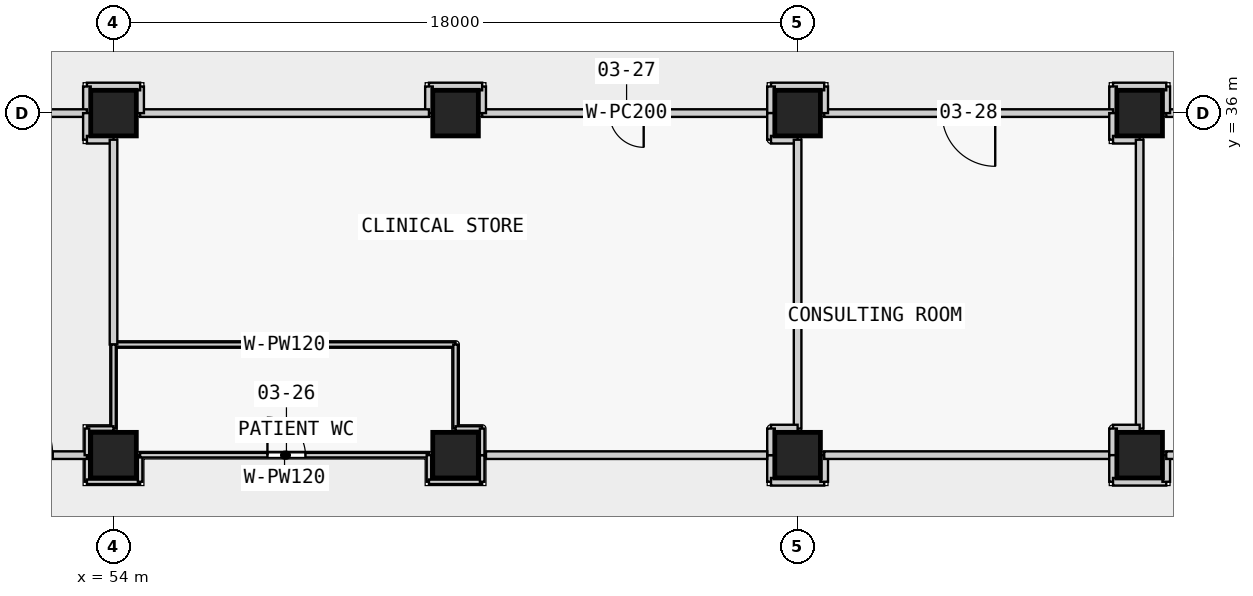
"""IFC4 building model, lengths in metres.
Left out: names, types, materials, properties, quantities, classifications, styles, units other than length and angle.
Written with IfcOpenShell. Run it as: python <this file> out.ifc"""

import sys

from ifc_helpers import new_model, si_unit, direction, frame, frame_2d, origin, origin_2d, place, context, subcontext, project, spatial, rectangle, extrude, element, fill, save


model = new_model("IFC4")
c1 = context("Model", 3, precision=1e-05, world=origin(), true_north=direction((0.0, 1.0)))
c2 = subcontext(c1, "Body", "Model", "MODEL_VIEW")
j1 = project(units=[si_unit("LENGTHUNIT", "METRE"), si_unit("PLANEANGLEUNIT", "RADIAN")], contexts=[c1])
p1 = place(None, origin())
s1 = spatial("IfcSite", under=j1, at=p1, CompositionType="ELEMENT")
p2 = place(p1, origin())
s2 = spatial("IfcBuilding", under=s1, at=p2, CompositionType="ELEMENT")
p3 = place(p2, frame((0.0, 0.0, 17.3)))
s3 = spatial("IfcBuildingStorey", under=s2, at=p3, CompositionType="ELEMENT", Elevation=17.3)
for number, where, z_axis, x_axis in (
    (1, (54.0, 27.0, 0.0), (0.0, 0.0, 1.0), (1.0, 0.0, 0.0)),
    (2, (54.0, 36.0, 0.0), (0.0, 0.0, 1.0), (1.0, 0.0, 0.0)),
    (3, (63.0, 27.0, 0.0), (0.0, 0.0, 1.0), (1.0, 0.0, 0.0)),
    (4, (63.0, 36.0, 0.0), (0.0, 0.0, 1.0), (1.0, 0.0, 0.0)),
    (5, (72.0, 27.0, 0.0), (0.0, 0.0, 1.0), (1.0, 0.0, 0.0)),
    (6, (72.0, 36.0, 0.0), (0.0, 0.0, 1.0), (1.0, 0.0, 0.0)),
    (7, (81.0, 27.0, 0.0), (0.0, 0.0, 1.0), (1.0, 0.0, 0.0)),
    (8, (81.0, 36.0, 0.0), (0.0, 0.0, 1.0), (1.0, 0.0, 0.0)),
):
    element("IfcColumn", number, at=place(p3, frame(where, z_axis=z_axis, x_axis=x_axis)), inside=s3, PredefinedType="COLUMN", context=c2, shape_type="SweptSolid", body=[
        extrude(rectangle(XDim=1.2, YDim=1.2, at=origin_2d()), origin(), (0.0, 0.0, 1.0), 4.5),
    ])
p4 = place(p3, frame((71.3, 36.0, 0.0), z_axis=(0.0, 0.0, 1.0), x_axis=(-1.0, 0.0, 0.0)))
e9 = element("IfcWall", 9, at=p4, inside=s3, PredefinedType="PARTITIONING", context=c2, shape_type="SweptSolid", body=[
    extrude(rectangle(XDim=7.6, YDim=0.2, at=frame_2d((3.8, 0.0))), origin(), (0.0, 0.0, 1.0), 4.15),
])
p5 = place(p4, frame((3.35, 0.0, 0.0)))
e10 = element("IfcOpeningElement", 10, at=p5, cuts=e9, PredefinedType="OPENING", context=c2, shape_type="SweptSolid", body=[
    extrude(rectangle(XDim=0.9, YDim=2.1, at=frame_2d((0.45, 1.05))), frame((0.0, 0.11, 0.0), z_axis=(0.0, -1.0, 0.0), x_axis=(1.0, 0.0, 0.0)), (0.0, 0.0, 1.0), 0.22),
])
p6 = place(p3, frame((63.7, 36.0, 0.0), z_axis=(0.0, 0.0, 1.0), x_axis=(0.0, 1.0, 0.0)))
e11 = element("IfcWall", 11, at=p6, inside=s3, PredefinedType="PARTITIONING", context=c2, shape_type="SweptSolid", body=[
    extrude(rectangle(XDim=0.7, YDim=0.2, at=frame_2d((0.35, 0.0))), origin(), (0.0, 0.0, 1.0), 4.15),
])
p7 = place(p3, frame((63.7, 36.7, 0.0), z_axis=(0.0, 0.0, 1.0), x_axis=(-1.0, 0.0, 0.0)))
e12 = element("IfcWall", 12, at=p7, inside=s3, PredefinedType="PARTITIONING", context=c2, shape_type="SweptSolid", body=[
    extrude(rectangle(XDim=1.4, YDim=0.2, at=frame_2d((0.7, 0.0))), origin(), (0.0, 0.0, 1.0), 4.15),
])
p8 = place(p3, frame((62.3, 36.7, 0.0), z_axis=(0.0, 0.0, 1.0), x_axis=(0.0, -1.0, 0.0)))
e13 = element("IfcWall", 13, at=p8, inside=s3, PredefinedType="PARTITIONING", context=c2, shape_type="SweptSolid", body=[
    extrude(rectangle(XDim=0.7, YDim=0.2, at=frame_2d((0.35, 0.0))), origin(), (0.0, 0.0, 1.0), 4.15),
])
p9 = place(p3, frame((62.3, 36.0, 0.0), z_axis=(0.0, 0.0, 1.0), x_axis=(-1.0, 0.0, 0.0)))
e14 = element("IfcWall", 14, at=p9, inside=s3, PredefinedType="PARTITIONING", context=c2, shape_type="SweptSolid", body=[
    extrude(rectangle(XDim=7.6, YDim=0.2, at=frame_2d((3.8, 0.0))), origin(), (0.0, 0.0, 1.0), 4.15),
])
p10 = place(p3, frame((54.7, 36.0, 0.0), z_axis=(0.0, 0.0, 1.0), x_axis=(0.0, 1.0, 0.0)))
e15 = element("IfcWall", 15, at=p10, inside=s3, PredefinedType="PARTITIONING", context=c2, shape_type="SweptSolid", body=[
    extrude(rectangle(XDim=0.7, YDim=0.2, at=frame_2d((0.35, 0.0))), origin(), (0.0, 0.0, 1.0), 4.15),
])
p11 = place(p3, frame((54.7, 36.7, 0.0), z_axis=(0.0, 0.0, 1.0), x_axis=(-1.0, 0.0, 0.0)))
e16 = element("IfcWall", 16, at=p11, inside=s3, PredefinedType="PARTITIONING", context=c2, shape_type="SweptSolid", body=[
    extrude(rectangle(XDim=1.4, YDim=0.2, at=frame_2d((0.7, 0.0))), origin(), (0.0, 0.0, 1.0), 4.15),
])
p12 = place(p3, frame((53.3, 36.7, 0.0), z_axis=(0.0, 0.0, 1.0), x_axis=(0.0, -1.0, 0.0)))
e17 = element("IfcWall", 17, at=p12, inside=s3, PredefinedType="PARTITIONING", context=c2, shape_type="SweptSolid", body=[
    extrude(rectangle(XDim=0.7, YDim=0.2, at=frame_2d((0.35, 0.0))), origin(), (0.0, 0.0, 1.0), 4.15),
])
p13 = place(p3, frame((53.3, 27.0, 0.0), z_axis=(0.0, 0.0, 1.0), x_axis=(0.0, -1.0, 0.0)))
e18 = element("IfcWall", 18, at=p13, inside=s3, PredefinedType="PARTITIONING", context=c2, shape_type="SweptSolid", body=[
    extrude(rectangle(XDim=0.7, YDim=0.12, at=frame_2d((0.35, 0.0))), origin(), (0.0, 0.0, 1.0), 4.15),
])
p14 = place(p3, frame((53.3, 26.3, 0.0), z_axis=(0.0, 0.0, 1.0), x_axis=(1.0, 0.0, 0.0)))
e19 = element("IfcWall", 19, at=p14, inside=s3, PredefinedType="PARTITIONING", context=c2, shape_type="SweptSolid", body=[
    extrude(rectangle(XDim=1.4, YDim=0.12, at=frame_2d((0.7, 0.0))), origin(), (0.0, 0.0, 1.0), 4.15),
])
p15 = place(p3, frame((54.7, 26.3, 0.0), z_axis=(0.0, 0.0, 1.0), x_axis=(0.0, 1.0, 0.0)))
e20 = element("IfcWall", 20, at=p15, inside=s3, PredefinedType="PARTITIONING", context=c2, shape_type="SweptSolid", body=[
    extrude(rectangle(XDim=0.7, YDim=0.12, at=frame_2d((0.35, 0.0))), origin(), (0.0, 0.0, 1.0), 4.15),
])
p16 = place(p3, frame((54.7, 27.0, 0.0), z_axis=(0.0, 0.0, 1.0), x_axis=(1.0, 0.0, 0.0)))
e21 = element("IfcWall", 21, at=p16, inside=s3, PredefinedType="PARTITIONING", context=c2, shape_type="SweptSolid", body=[
    extrude(rectangle(XDim=7.6, YDim=0.12, at=frame_2d((3.8, 0.0))), origin(), (0.0, 0.0, 1.0), 4.15),
])
p17 = place(p16, frame((3.35, 0.0, 0.0)))
e22 = element("IfcOpeningElement", 22, at=p17, cuts=e21, PredefinedType="OPENING", context=c2, shape_type="SweptSolid", body=[
    extrude(rectangle(XDim=1.0, YDim=2.1, at=frame_2d((0.5, 1.05))), frame((0.0, 0.07, 0.0), z_axis=(0.0, -1.0, 0.0), x_axis=(1.0, 0.0, 0.0)), (0.0, 0.0, 1.0), 0.14),
])
p18 = place(p3, frame((62.3, 27.0, 0.0), z_axis=(0.0, 0.0, 1.0), x_axis=(0.0, -1.0, 0.0)))
e23 = element("IfcWall", 23, at=p18, inside=s3, PredefinedType="PARTITIONING", context=c2, shape_type="SweptSolid", body=[
    extrude(rectangle(XDim=0.7, YDim=0.12, at=frame_2d((0.35, 0.0))), origin(), (0.0, 0.0, 1.0), 4.15),
])
p19 = place(p3, frame((62.3, 26.3, 0.0), z_axis=(0.0, 0.0, 1.0), x_axis=(1.0, 0.0, 0.0)))
e24 = element("IfcWall", 24, at=p19, inside=s3, PredefinedType="PARTITIONING", context=c2, shape_type="SweptSolid", body=[
    extrude(rectangle(XDim=1.4, YDim=0.12, at=frame_2d((0.7, 0.0))), origin(), (0.0, 0.0, 1.0), 4.15),
])
p20 = place(p3, frame((63.7, 26.3, 0.0), z_axis=(0.0, 0.0, 1.0), x_axis=(0.0, 1.0, 0.0)))
e25 = element("IfcWall", 25, at=p20, inside=s3, PredefinedType="PARTITIONING", context=c2, shape_type="SweptSolid", body=[
    extrude(rectangle(XDim=0.7, YDim=0.12, at=frame_2d((0.35, 0.0))), origin(), (0.0, 0.0, 1.0), 4.15),
])
p21 = place(p3, frame((89.3, 36.0, 0.0), z_axis=(0.0, 0.0, 1.0), x_axis=(-1.0, 0.0, 0.0)))
e26 = element("IfcWall", 26, at=p21, inside=s3, PredefinedType="PARTITIONING", context=c2, shape_type="SweptSolid", body=[
    extrude(rectangle(XDim=7.6, YDim=0.2, at=frame_2d((3.8, 0.0))), origin(), (0.0, 0.0, 1.0), 4.15),
])
p22 = place(p21, frame((3.1, 0.0, 0.0)))
e27 = element("IfcOpeningElement", 27, at=p22, cuts=e26, PredefinedType="OPENING", context=c2, shape_type="SweptSolid", body=[
    extrude(rectangle(XDim=1.4, YDim=2.1, at=frame_2d((0.7, 1.05))), frame((0.0, 0.11, 0.0), z_axis=(0.0, -1.0, 0.0), x_axis=(1.0, 0.0, 0.0)), (0.0, 0.0, 1.0), 0.22),
])
p23 = place(p3, frame((81.7, 36.0, 0.0), z_axis=(0.0, 0.0, 1.0), x_axis=(0.0, 1.0, 0.0)))
e28 = element("IfcWall", 28, at=p23, inside=s3, PredefinedType="PARTITIONING", context=c2, shape_type="SweptSolid", body=[
    extrude(rectangle(XDim=0.7, YDim=0.2, at=frame_2d((0.35, 0.0))), origin(), (0.0, 0.0, 1.0), 4.15),
])
p24 = place(p3, frame((81.7, 36.7, 0.0), z_axis=(0.0, 0.0, 1.0), x_axis=(-1.0, 0.0, 0.0)))
e29 = element("IfcWall", 29, at=p24, inside=s3, PredefinedType="PARTITIONING", context=c2, shape_type="SweptSolid", body=[
    extrude(rectangle(XDim=1.4, YDim=0.2, at=frame_2d((0.7, 0.0))), origin(), (0.0, 0.0, 1.0), 4.15),
])
p25 = place(p3, frame((80.3, 36.7, 0.0), z_axis=(0.0, 0.0, 1.0), x_axis=(0.0, -1.0, 0.0)))
e30 = element("IfcWall", 30, at=p25, inside=s3, PredefinedType="PARTITIONING", context=c2, shape_type="SweptSolid", body=[
    extrude(rectangle(XDim=0.7, YDim=0.2, at=frame_2d((0.35, 0.0))), origin(), (0.0, 0.0, 1.0), 4.15),
])
p26 = place(p3, frame((54.0, 29.911, 0.0), z_axis=(0.0, 0.0, 1.0), x_axis=(1.0, 0.0, 0.0)))
e31 = element("IfcWall", 31, at=p26, inside=s3, PredefinedType="PARTITIONING", context=c2, shape_type="SweptSolid", body=[
    extrude(rectangle(XDim=9.0, YDim=0.12, at=frame_2d((4.5, 0.0))), origin(), (0.0, 0.0, 1.0), 4.15),
])
p27 = place(p3, frame((63.0, 29.911, 0.0), z_axis=(0.0, 0.0, 1.0), x_axis=(0.0, -1.0, 0.0)))
e32 = element("IfcWall", 32, at=p27, inside=s3, PredefinedType="PARTITIONING", context=c2, shape_type="SweptSolid", body=[
    extrude(rectangle(XDim=2.211, YDim=0.12, at=frame_2d((1.105, 0.0))), origin(), (0.0, 0.0, 1.0), 4.15),
])
for number, where, z_axis, x_axis in (
    (33, (63.0, 27.7, 0.0), (0.0, 0.0, 1.0), (1.0, 0.0, 0.0)),
    (34, (63.7, 27.7, 0.0), (0.0, 0.0, 1.0), (0.0, -1.0, 0.0)),
):
    element("IfcWall", number, at=place(p3, frame(where, z_axis=z_axis, x_axis=x_axis)), inside=s3, PredefinedType="PARTITIONING", context=c2, shape_type="SweptSolid", body=[
        extrude(rectangle(XDim=0.7, YDim=0.12, at=frame_2d((0.35, 0.0))), origin(), (0.0, 0.0, 1.0), 4.15),
    ])
p28 = place(p3, frame((80.3, 36.0, 0.0), z_axis=(0.0, 0.0, 1.0), x_axis=(-1.0, 0.0, 0.0)))
e35 = element("IfcWall", 35, at=p28, inside=s3, PredefinedType="PARTITIONING", context=c2, shape_type="SweptSolid", body=[
    extrude(rectangle(XDim=7.6, YDim=0.2, at=frame_2d((3.8, 0.0))), origin(), (0.0, 0.0, 1.0), 4.15),
])
p29 = place(p28, frame((3.1, 0.0, 0.0)))
e36 = element("IfcOpeningElement", 36, at=p29, cuts=e35, PredefinedType="OPENING", context=c2, shape_type="SweptSolid", body=[
    extrude(rectangle(XDim=1.4, YDim=2.1, at=frame_2d((0.7, 1.05))), frame((0.0, 0.11, 0.0), z_axis=(0.0, -1.0, 0.0), x_axis=(1.0, 0.0, 0.0)), (0.0, 0.0, 1.0), 0.22),
])
p30 = place(p3, frame((72.7, 36.0, 0.0), z_axis=(0.0, 0.0, 1.0), x_axis=(0.0, 1.0, 0.0)))
e37 = element("IfcWall", 37, at=p30, inside=s3, PredefinedType="PARTITIONING", context=c2, shape_type="SweptSolid", body=[
    extrude(rectangle(XDim=0.7, YDim=0.2, at=frame_2d((0.35, 0.0))), origin(), (0.0, 0.0, 1.0), 4.15),
])
p31 = place(p3, frame((72.7, 36.7, 0.0), z_axis=(0.0, 0.0, 1.0), x_axis=(-1.0, 0.0, 0.0)))
e38 = element("IfcWall", 38, at=p31, inside=s3, PredefinedType="PARTITIONING", context=c2, shape_type="SweptSolid", body=[
    extrude(rectangle(XDim=1.4, YDim=0.2, at=frame_2d((0.7, 0.0))), origin(), (0.0, 0.0, 1.0), 4.15),
])
for number, where, z_axis, x_axis in (
    (39, (71.3, 36.7, 0.0), (0.0, 0.0, 1.0), (0.0, -1.0, 0.0)),
    (40, (71.3, 27.0, 0.0), (0.0, 0.0, 1.0), (0.0, -1.0, 0.0)),
):
    element("IfcWall", number, at=place(p3, frame(where, z_axis=z_axis, x_axis=x_axis)), inside=s3, PredefinedType="PARTITIONING", context=c2, shape_type="SweptSolid", body=[
        extrude(rectangle(XDim=0.7, YDim=0.2, at=frame_2d((0.35, 0.0))), origin(), (0.0, 0.0, 1.0), 4.15),
    ])
p32 = place(p3, frame((71.3, 26.3, 0.0), z_axis=(0.0, 0.0, 1.0), x_axis=(1.0, 0.0, 0.0)))
e41 = element("IfcWall", 41, at=p32, inside=s3, PredefinedType="PARTITIONING", context=c2, shape_type="SweptSolid", body=[
    extrude(rectangle(XDim=1.4, YDim=0.2, at=frame_2d((0.7, 0.0))), origin(), (0.0, 0.0, 1.0), 4.15),
])
p33 = place(p3, frame((72.7, 26.3, 0.0), z_axis=(0.0, 0.0, 1.0), x_axis=(0.0, 1.0, 0.0)))
e42 = element("IfcWall", 42, at=p33, inside=s3, PredefinedType="PARTITIONING", context=c2, shape_type="SweptSolid", body=[
    extrude(rectangle(XDim=0.7, YDim=0.2, at=frame_2d((0.35, 0.0))), origin(), (0.0, 0.0, 1.0), 4.15),
])
p34 = place(p3, frame((72.7, 27.0, 0.0), z_axis=(0.0, 0.0, 1.0), x_axis=(1.0, 0.0, 0.0)))
e43 = element("IfcWall", 43, at=p34, inside=s3, PredefinedType="PARTITIONING", context=c2, shape_type="SweptSolid", body=[
    extrude(rectangle(XDim=7.6, YDim=0.2, at=frame_2d((3.8, 0.0))), origin(), (0.0, 0.0, 1.0), 4.15),
])
for number, where, z_axis, x_axis in (
    (44, (80.3, 36.0, 0.0), (0.0, 0.0, 1.0), (0.0, -1.0, 0.0)),
    (45, (80.3, 35.3, 0.0), (0.0, 0.0, 1.0), (1.0, 0.0, 0.0)),
):
    element("IfcWall", number, at=place(p3, frame(where, z_axis=z_axis, x_axis=x_axis)), inside=s3, PredefinedType="PARTITIONING", context=c2, shape_type="SweptSolid", body=[
        extrude(rectangle(XDim=0.7, YDim=0.2, at=frame_2d((0.35, 0.0))), origin(), (0.0, 0.0, 1.0), 4.15),
    ])
p35 = place(p3, frame((81.0, 35.3, 0.0), z_axis=(0.0, 0.0, 1.0), x_axis=(0.0, -1.0, 0.0)))
e46 = element("IfcWall", 46, at=p35, inside=s3, PredefinedType="PARTITIONING", context=c2, shape_type="SweptSolid", body=[
    extrude(rectangle(XDim=7.6, YDim=0.2, at=frame_2d((3.8, 0.0))), origin(), (0.0, 0.0, 1.0), 4.15),
])
for number, where, z_axis, x_axis in (
    (47, (81.0, 27.7, 0.0), (0.0, 0.0, 1.0), (-1.0, 0.0, 0.0)),
    (48, (80.3, 27.7, 0.0), (0.0, 0.0, 1.0), (0.0, -1.0, 0.0)),
    (49, (71.3, 36.0, 0.0), (0.0, 0.0, 1.0), (0.0, -1.0, 0.0)),
    (50, (71.3, 35.3, 0.0), (0.0, 0.0, 1.0), (1.0, 0.0, 0.0)),
):
    element("IfcWall", number, at=place(p3, frame(where, z_axis=z_axis, x_axis=x_axis)), inside=s3, PredefinedType="PARTITIONING", context=c2, shape_type="SweptSolid", body=[
        extrude(rectangle(XDim=0.7, YDim=0.2, at=frame_2d((0.35, 0.0))), origin(), (0.0, 0.0, 1.0), 4.15),
    ])
p36 = place(p3, frame((72.0, 35.3, 0.0), z_axis=(0.0, 0.0, 1.0), x_axis=(0.0, -1.0, 0.0)))
e51 = element("IfcWall", 51, at=p36, inside=s3, PredefinedType="PARTITIONING", context=c2, shape_type="SweptSolid", body=[
    extrude(rectangle(XDim=7.6, YDim=0.2, at=frame_2d((3.8, 0.0))), origin(), (0.0, 0.0, 1.0), 4.15),
])
for number, where, z_axis, x_axis in (
    (52, (72.0, 27.7, 0.0), (0.0, 0.0, 1.0), (-1.0, 0.0, 0.0)),
    (53, (71.3, 27.7, 0.0), (0.0, 0.0, 1.0), (0.0, -1.0, 0.0)),
):
    element("IfcWall", number, at=place(p3, frame(where, z_axis=z_axis, x_axis=x_axis)), inside=s3, PredefinedType="PARTITIONING", context=c2, shape_type="SweptSolid", body=[
        extrude(rectangle(XDim=0.7, YDim=0.2, at=frame_2d((0.35, 0.0))), origin(), (0.0, 0.0, 1.0), 4.15),
    ])
p37 = place(p3, frame((53.3, 36.0, 0.0), z_axis=(0.0, 0.0, 1.0), x_axis=(-1.0, 0.0, 0.0)))
e54 = element("IfcWall", 54, at=p37, inside=s3, PredefinedType="PARTITIONING", context=c2, shape_type="SweptSolid", body=[
    extrude(rectangle(XDim=7.6, YDim=0.2, at=frame_2d((3.8, 0.0))), origin(), (0.0, 0.0, 1.0), 4.15),
])
p38 = place(p37, frame((2.85, 0.0, 0.0)))
e55 = element("IfcOpeningElement", 55, at=p38, cuts=e54, PredefinedType="OPENING", context=c2, shape_type="SweptSolid", body=[
    extrude(rectangle(XDim=1.8, YDim=2.1, at=frame_2d((0.9, 1.05))), frame((0.0, 0.11, 0.0), z_axis=(0.0, -1.0, 0.0), x_axis=(1.0, 0.0, 0.0)), (0.0, 0.0, 1.0), 0.22),
])
p39 = place(p3, frame((63.8, 27.0, 0.0), z_axis=(0.0, 0.0, 1.0), x_axis=(1.0, 0.0, 0.0)))
e56 = element("IfcWall", 56, at=p39, inside=s3, PredefinedType="PARTITIONING", context=c2, shape_type="SweptSolid", body=[
    extrude(rectangle(XDim=7.4, YDim=0.2, at=frame_2d((3.7, 0.0))), origin(), (0.0, 0.0, 1.0), 4.15),
])
for number, where, z_axis, x_axis in (
    (57, (53.3, 36.0, 0.0), (0.0, 0.0, 1.0), (0.0, -1.0, 0.0)),
    (58, (53.3, 35.3, 0.0), (0.0, 0.0, 1.0), (1.0, 0.0, 0.0)),
):
    element("IfcWall", number, at=place(p3, frame(where, z_axis=z_axis, x_axis=x_axis)), inside=s3, PredefinedType="PARTITIONING", context=c2, shape_type="SweptSolid", body=[
        extrude(rectangle(XDim=0.7, YDim=0.2, at=frame_2d((0.35, 0.0))), origin(), (0.0, 0.0, 1.0), 4.15),
    ])
p40 = place(p3, frame((54.0, 35.3, 0.0), z_axis=(0.0, 0.0, 1.0), x_axis=(0.0, -1.0, 0.0)))
e59 = element("IfcWall", 59, at=p40, inside=s3, PredefinedType="PARTITIONING", context=c2, shape_type="SweptSolid", body=[
    extrude(rectangle(XDim=5.389, YDim=0.2, at=frame_2d((2.695, 0.0))), origin(), (0.0, 0.0, 1.0), 4.15),
])
p41 = place(p3, frame((80.3, 27.0, 0.0), z_axis=(0.0, 0.0, 1.0), x_axis=(0.0, -1.0, 0.0)))
e60 = element("IfcWall", 60, at=p41, inside=s3, PredefinedType="PARTITIONING", context=c2, shape_type="SweptSolid", body=[
    extrude(rectangle(XDim=0.7, YDim=0.2, at=frame_2d((0.35, 0.0))), origin(), (0.0, 0.0, 1.0), 4.15),
])
p42 = place(p3, frame((80.3, 26.3, 0.0), z_axis=(0.0, 0.0, 1.0), x_axis=(1.0, 0.0, 0.0)))
e61 = element("IfcWall", 61, at=p42, inside=s3, PredefinedType="PARTITIONING", context=c2, shape_type="SweptSolid", body=[
    extrude(rectangle(XDim=1.4, YDim=0.2, at=frame_2d((0.7, 0.0))), origin(), (0.0, 0.0, 1.0), 4.15),
])
p43 = place(p3, frame((81.7, 26.3, 0.0), z_axis=(0.0, 0.0, 1.0), x_axis=(0.0, 1.0, 0.0)))
e62 = element("IfcWall", 62, at=p43, inside=s3, PredefinedType="PARTITIONING", context=c2, shape_type="SweptSolid", body=[
    extrude(rectangle(XDim=0.7, YDim=0.2, at=frame_2d((0.35, 0.0))), origin(), (0.0, 0.0, 1.0), 4.15),
])
p44 = place(p3, frame((81.7, 27.0, 0.0), z_axis=(0.0, 0.0, 1.0), x_axis=(1.0, 0.0, 0.0)))
e63 = element("IfcWall", 63, at=p44, inside=s3, PredefinedType="PARTITIONING", context=c2, shape_type="SweptSolid", body=[
    extrude(rectangle(XDim=1.7, YDim=0.2, at=frame_2d((0.85, 0.0))), origin(), (0.0, 0.0, 1.0), 4.15),
])
p45 = place(p3, frame((49.5, 27.0, 0.0), z_axis=(0.0, 0.0, 1.0), x_axis=(1.0, 0.0, 0.0)))
e64 = element("IfcWall", 64, at=p45, inside=s3, PredefinedType="PARTITIONING", context=c2, shape_type="SweptSolid", body=[
    extrude(rectangle(XDim=3.8, YDim=0.2, at=frame_2d((1.9, 0.0))), origin(), (0.0, 0.0, 1.0), 4.15),
])
p46 = place(p45, frame((1.1, 0.0, 0.0)))
e65 = element("IfcOpeningElement", 65, at=p46, cuts=e64, PredefinedType="OPENING", context=c2, shape_type="SweptSolid", body=[
    extrude(rectangle(XDim=1.8, YDim=2.1, at=frame_2d((0.9, 1.05))), frame((0.0, 0.11, 0.0), z_axis=(0.0, -1.0, 0.0), x_axis=(1.0, 0.0, 0.0)), (0.0, 0.0, 1.0), 0.22),
])
p47 = place(p3, frame((54.0, 29.911, 0.0), z_axis=(0.0, 0.0, 1.0), x_axis=(0.0, -1.0, 0.0)))
e66 = element("IfcWall", 66, at=p47, inside=s3, PredefinedType="PARTITIONING", context=c2, shape_type="SweptSolid", body=[
    extrude(rectangle(XDim=2.211, YDim=0.12, at=frame_2d((1.105, 0.0))), origin(), (0.0, 0.0, 1.0), 4.15),
])
for number, where, z_axis, x_axis in (
    (67, (54.0, 27.7, 0.0), (0.0, 0.0, 1.0), (-1.0, 0.0, 0.0)),
    (68, (53.3, 27.7, 0.0), (0.0, 0.0, 1.0), (0.0, -1.0, 0.0)),
):
    element("IfcWall", number, at=place(p3, frame(where, z_axis=z_axis, x_axis=x_axis)), inside=s3, PredefinedType="PARTITIONING", context=c2, shape_type="SweptSolid", body=[
        extrude(rectangle(XDim=0.7, YDim=0.12, at=frame_2d((0.35, 0.0))), origin(), (0.0, 0.0, 1.0), 4.15),
    ])
p48 = place(p17, origin())
e69 = element("IfcDoor", 69, at=p48, inside=s3, OperationType="SINGLE_SWING_LEFT", PredefinedType="DOOR", context=c2, shape_type="SweptSolid", body=[
    extrude(rectangle(XDim=1.0, YDim=2.1, at=frame_2d((0.5, 1.05))), frame((0.0, 0.025, 0.0), z_axis=(0.0, -1.0, 0.0), x_axis=(1.0, 0.0, 0.0)), (0.0, 0.0, 1.0), 0.05),
])
fill(e22, e69)
p49 = place(p5, origin())
e70 = element("IfcDoor", 70, at=p49, inside=s3, OperationType="SINGLE_SWING_LEFT", PredefinedType="DOOR", context=c2, shape_type="SweptSolid", body=[
    extrude(rectangle(XDim=0.9, YDim=2.1, at=frame_2d((0.45, 1.05))), frame((0.0, 0.025, 0.0), z_axis=(0.0, -1.0, 0.0), x_axis=(1.0, 0.0, 0.0)), (0.0, 0.0, 1.0), 0.05),
])
fill(e10, e70)
p50 = place(p29, origin())
e71 = element("IfcDoor", 71, at=p50, inside=s3, OperationType="SINGLE_SWING_LEFT", PredefinedType="DOOR", context=c2, shape_type="SweptSolid", body=[
    extrude(rectangle(XDim=1.4, YDim=2.1, at=frame_2d((0.7, 1.05))), frame((0.0, 0.025, 0.0), z_axis=(0.0, -1.0, 0.0), x_axis=(1.0, 0.0, 0.0)), (0.0, 0.0, 1.0), 0.05),
])
fill(e36, e71)
p51 = place(p46, origin())
e72 = element("IfcDoor", 72, at=p51, inside=s3, OperationType="DOUBLE_DOOR_SINGLE_SWING", PredefinedType="DOOR", context=c2, shape_type="SweptSolid", body=[
    extrude(rectangle(XDim=1.8, YDim=2.1, at=frame_2d((0.9, 1.05))), frame((0.0, 0.025, 0.0), z_axis=(0.0, -1.0, 0.0), x_axis=(1.0, 0.0, 0.0)), (0.0, 0.0, 1.0), 0.05),
])
fill(e65, e72)
save(model, sys.argv[1])
